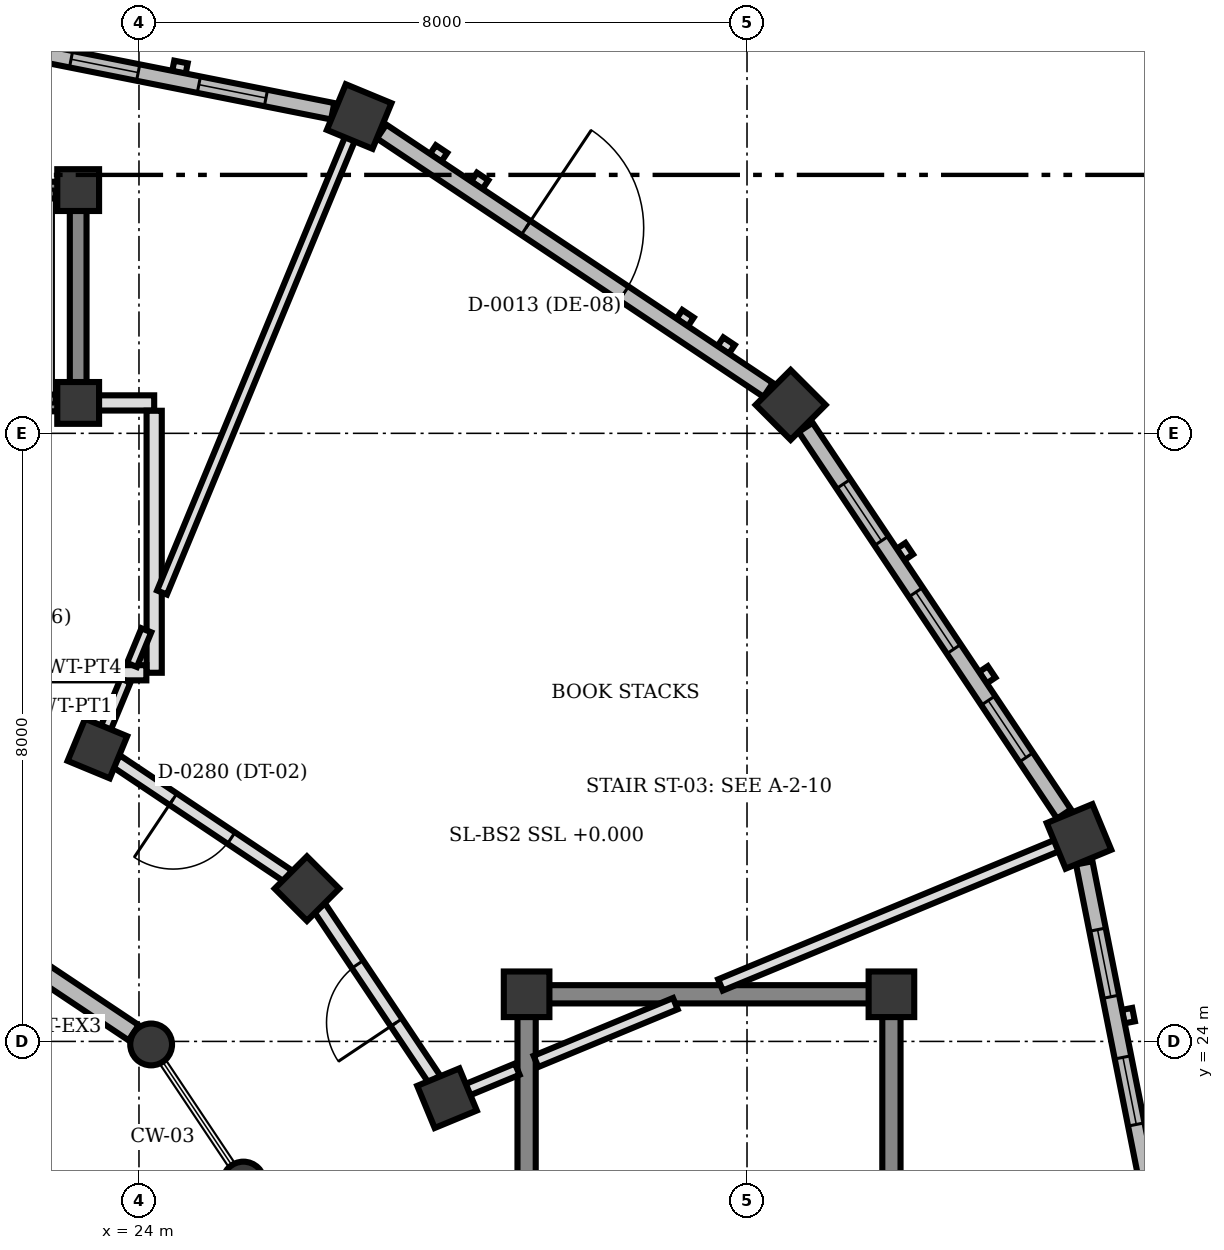
"""IFC4 building model, lengths in metres.
Left out: names, types, materials, properties, quantities, classifications, styles, units other than length and angle.
Written with IfcOpenShell. Run it as: python <this file> out.ifc"""

import sys

from ifc_helpers import new_model, si_unit, direction, frame, frame_2d, origin, origin_2d, place, context, subcontext, project, spatial, rectangle, circle, extrude, element, fill, save


model = new_model("IFC4")
c1 = context("Model", 3, precision=1e-05, world=origin(), true_north=direction((0.0, 1.0)))
c2 = subcontext(c1, "Body", "Model", "MODEL_VIEW")
j1 = project(units=[si_unit("LENGTHUNIT", "METRE"), si_unit("PLANEANGLEUNIT", "RADIAN")], contexts=[c1])
p1 = place(None, origin())
s1 = spatial("IfcSite", under=j1, at=p1, CompositionType="ELEMENT")
p2 = place(p1, origin())
s2 = spatial("IfcBuilding", under=s1, at=p2, CompositionType="ELEMENT")
p3 = place(p2, origin())
s3 = spatial("IfcBuildingStorey", under=s2, at=p3, CompositionType="ELEMENT", Elevation=0.0)
for number, where, z_axis, x_axis in (
    (1, (33.9, 24.62, 0.0), (0.0, 0.0, 1.0), (1.0, 0.0, 0.0)),
    (2, (29.1, 24.62, 0.0), (0.0, 0.0, 1.0), (1.0, 0.0, 0.0)),
):
    element("IfcColumn", number, at=place(p3, frame(where, z_axis=z_axis, x_axis=x_axis)), inside=s3, PredefinedType="COLUMN", context=c2, shape_type="SweptSolid", body=[
        extrude(rectangle(XDim=0.6, YDim=0.6, at=origin_2d()), origin(), (0.0, 0.0, 1.0), 4.5),
    ])
for number, where, z_axis, x_axis in (
    (3, (23.2, 32.4, 0.0), (0.0, 0.0, 1.0), (1.0, 0.0, 0.0)),
    (4, (23.2, 35.2, 0.0), (0.0, 0.0, 1.0), (1.0, 0.0, 0.0)),
):
    element("IfcColumn", number, at=place(p3, frame(where, z_axis=z_axis, x_axis=x_axis)), inside=s3, PredefinedType="COLUMN", context=c2, shape_type="SweptSolid", body=[
        extrude(rectangle(XDim=0.55, YDim=0.55, at=origin_2d()), origin(), (0.0, 0.0, 1.0), 4.5),
    ])
for number, where, z_axis, x_axis in (
    (5, (25.374, 22.143, 0.0), (0.0, 0.0, 1.0), (1.0, 0.0, 0.0)),
    (6, (24.16, 23.96, 0.0), (0.0, 0.0, 1.0), (1.0, 0.0, 0.0)),
):
    element("IfcColumn", number, at=place(p3, frame(where, z_axis=z_axis, x_axis=x_axis)), inside=s3, PredefinedType="COLUMN", context=c2, shape_type="SweptSolid", body=[
        extrude(circle(Radius=0.275, at=origin_2d()), origin(), (0.0, 0.0, 1.0), 4.5),
    ])
for number, where, z_axis, x_axis in (
    (7, (28.053, 23.253, 0.0), (0.0, 0.0, 1.0), (0.924, 0.383, 0.0)),
    (8, (26.21, 26.01, 0.0), (0.0, 0.0, 1.0), (0.707, 0.707, 0.0)),
    (9, (23.453, 27.853, 0.0), (0.0, 0.0, 1.0), (0.383, 0.924, 0.0)),
):
    element("IfcColumn", number, at=place(p3, frame(where, z_axis=z_axis, x_axis=x_axis)), inside=s3, PredefinedType="COLUMN", context=c2, shape_type="SweptSolid", body=[
        extrude(rectangle(XDim=0.6, YDim=0.6, at=origin_2d()), origin(), (0.0, 0.0, 1.0), 4.5),
    ])
for number, where, z_axis, x_axis in (
    (10, (36.368, 26.697, 0.0), (0.0, 0.0, 1.0), (0.924, 0.383, 0.0)),
    (11, (32.574, 32.374, 0.0), (0.0, 0.0, 1.0), (0.707, 0.707, 0.0)),
    (12, (26.897, 36.168, 0.0), (0.0, 0.0, 1.0), (0.383, 0.924, 0.0)),
):
    element("IfcColumn", number, at=place(p3, frame(where, z_axis=z_axis, x_axis=x_axis)), inside=s3, PredefinedType="COLUMN", context=c2, shape_type="SweptSolid", body=[
        extrude(rectangle(XDim=0.65, YDim=0.65, at=origin_2d()), origin(), (0.0, 0.0, 1.0), 4.5),
    ])
p4 = place(p3, frame((36.437, 26.349, 0.0), z_axis=(0.0, 0.0, 1.0), x_axis=(0.195149240347, -0.980773558979, 0.0)))
e13 = element("IfcWall", 13, at=p4, inside=s3, PredefinedType="SOLIDWALL", context=c2, shape_type="SweptSolid", body=[
    extrude(rectangle(XDim=6.119, YDim=0.22, at=frame_2d((3.06, 0.0))), origin(), (0.0, 0.0, 1.0), 3.55),
])
p5 = place(p4, frame((0.896, 0.0, 0.85)))
e14 = element("IfcOpeningElement", 14, at=p5, cuts=e13, PredefinedType="OPENING", context=c2, shape_type="SweptSolid", body=[
    extrude(rectangle(XDim=0.9, YDim=1.4, at=frame_2d((0.45, 0.7))), frame((0.0, 0.12, 0.0), z_axis=(0.0, -1.0, 0.0), x_axis=(1.0, 0.0, 0.0)), (0.0, 0.0, 1.0), 0.24),
])
p6 = place(p4, frame((2.609, 0.0, 0.85)))
e15 = element("IfcOpeningElement", 15, at=p6, cuts=e13, PredefinedType="OPENING", context=c2, shape_type="SweptSolid", body=[
    extrude(rectangle(XDim=0.9, YDim=1.4, at=frame_2d((0.45, 0.7))), frame((0.0, 0.12, 0.0), z_axis=(0.0, -1.0, 0.0), x_axis=(1.0, 0.0, 0.0)), (0.0, 0.0, 1.0), 0.24),
])
p7 = place(p4, frame((4.323, 0.0, 0.85)))
e16 = element("IfcOpeningElement", 16, at=p7, cuts=e13, PredefinedType="OPENING", context=c2, shape_type="SweptSolid", body=[
    extrude(rectangle(XDim=0.9, YDim=1.4, at=frame_2d((0.45, 0.7))), frame((0.0, 0.12, 0.0), z_axis=(0.0, -1.0, 0.0), x_axis=(1.0, 0.0, 0.0)), (0.0, 0.0, 1.0), 0.24),
])
p8 = place(p3, frame((32.771, 32.079, 0.0), z_axis=(0.0, 0.0, 1.0), x_axis=(0.555657446161, -0.831411331728, 0.0)))
e17 = element("IfcWall", 17, at=p8, inside=s3, PredefinedType="SOLIDWALL", context=c2, shape_type="SweptSolid", body=[
    extrude(rectangle(XDim=6.119, YDim=0.22, at=frame_2d((3.059, 0.0))), origin(), (0.0, 0.0, 1.0), 3.55),
])
p9 = place(p8, frame((0.896, 0.0, 0.85)))
e18 = element("IfcOpeningElement", 18, at=p9, cuts=e17, PredefinedType="OPENING", context=c2, shape_type="SweptSolid", body=[
    extrude(rectangle(XDim=0.9, YDim=1.4, at=frame_2d((0.45, 0.7))), frame((0.0, 0.12, 0.0), z_axis=(0.0, -1.0, 0.0), x_axis=(1.0, 0.0, 0.0)), (0.0, 0.0, 1.0), 0.24),
])
p10 = place(p8, frame((2.609, 0.0, 0.85)))
e19 = element("IfcOpeningElement", 19, at=p10, cuts=e17, PredefinedType="OPENING", context=c2, shape_type="SweptSolid", body=[
    extrude(rectangle(XDim=0.9, YDim=1.4, at=frame_2d((0.45, 0.7))), frame((0.0, 0.12, 0.0), z_axis=(0.0, -1.0, 0.0), x_axis=(1.0, 0.0, 0.0)), (0.0, 0.0, 1.0), 0.24),
])
p11 = place(p8, frame((4.323, 0.0, 0.85)))
e20 = element("IfcOpeningElement", 20, at=p11, cuts=e17, PredefinedType="OPENING", context=c2, shape_type="SweptSolid", body=[
    extrude(rectangle(XDim=0.9, YDim=1.4, at=frame_2d((0.45, 0.7))), frame((0.0, 0.12, 0.0), z_axis=(0.0, -1.0, 0.0), x_axis=(1.0, 0.0, 0.0)), (0.0, 0.0, 1.0), 0.24),
])
p12 = place(p3, frame((27.192, 35.971, 0.0), z_axis=(0.0, 0.0, 1.0), x_axis=(0.831411331728, -0.555657446161, 0.0)))
e21 = element("IfcWall", 21, at=p12, inside=s3, PredefinedType="SOLIDWALL", context=c2, shape_type="SweptSolid", body=[
    extrude(rectangle(XDim=6.119, YDim=0.22, at=frame_2d((3.059, 0.0))), origin(), (0.0, 0.0, 1.0), 3.55),
])
p13 = place(p12, frame((2.284, 0.0, 0.0)))
e22 = element("IfcOpeningElement", 22, at=p13, cuts=e21, PredefinedType="OPENING", context=c2, shape_type="SweptSolid", body=[
    extrude(rectangle(XDim=1.55, YDim=2.2, at=frame_2d((0.775, 1.1))), frame((0.0, 0.12, 0.0), z_axis=(0.0, -1.0, 0.0), x_axis=(1.0, 0.0, 0.0)), (0.0, 0.0, 1.0), 0.24),
])
p14 = place(p3, frame((23.93, 24.114, 0.0), z_axis=(0.0, 0.0, 1.0), x_axis=(-0.83165874011, 0.555287078904, 0.0)))
e23 = element("IfcWall", 23, at=p14, inside=s3, PredefinedType="SOLIDWALL", context=c2, shape_type="SweptSolid", body=[
    extrude(rectangle(XDim=1.632, YDim=0.24, at=frame_2d((0.816, 0.0))), origin(), (0.0, 0.0, 1.0), 3.55),
])
p15 = place(p3, frame((20.548, 37.431, 0.0), z_axis=(0.0, 0.0, 1.0), x_axis=(0.98077967596, -0.19511849534, 0.0)))
e24 = element("IfcWall", 24, at=p15, inside=s3, PredefinedType="SOLIDWALL", context=c2, shape_type="SweptSolid", body=[
    extrude(rectangle(XDim=6.119, YDim=0.22, at=frame_2d((3.059, 0.0))), origin(), (0.0, 0.0, 1.0), 3.55),
])
p16 = place(p15, frame((0.896, 0.0, 0.85)))
e25 = element("IfcOpeningElement", 25, at=p16, cuts=e24, PredefinedType="OPENING", context=c2, shape_type="SweptSolid", body=[
    extrude(rectangle(XDim=0.9, YDim=1.4, at=frame_2d((0.45, 0.7))), frame((0.0, 0.12, 0.0), z_axis=(0.0, -1.0, 0.0), x_axis=(1.0, 0.0, 0.0)), (0.0, 0.0, 1.0), 0.24),
])
p17 = place(p15, frame((2.609, 0.0, 0.85)))
e26 = element("IfcOpeningElement", 26, at=p17, cuts=e24, PredefinedType="OPENING", context=c2, shape_type="SweptSolid", body=[
    extrude(rectangle(XDim=0.9, YDim=1.4, at=frame_2d((0.45, 0.7))), frame((0.0, 0.12, 0.0), z_axis=(0.0, -1.0, 0.0), x_axis=(1.0, 0.0, 0.0)), (0.0, 0.0, 1.0), 0.24),
])
p18 = place(p15, frame((4.323, 0.0, 0.85)))
e27 = element("IfcOpeningElement", 27, at=p18, cuts=e24, PredefinedType="OPENING", context=c2, shape_type="SweptSolid", body=[
    extrude(rectangle(XDim=0.9, YDim=1.4, at=frame_2d((0.45, 0.7))), frame((0.0, 0.12, 0.0), z_axis=(0.0, -1.0, 0.0), x_axis=(1.0, 0.0, 0.0)), (0.0, 0.0, 1.0), 0.24),
])
p19 = place(p3, frame((29.1, 16.192, 0.0), z_axis=(0.0, 0.0, 1.0), x_axis=(0.0, 1.0, 0.0)))
e28 = element("IfcWall", 28, at=p19, inside=s3, PredefinedType="SHEAR", context=c2, shape_type="SweptSolid", body=[
    extrude(rectangle(XDim=8.136, YDim=0.24, at=frame_2d((4.068, 0.0))), origin(), (0.0, 0.0, 1.0), 4.24),
])
p20 = place(p19, frame((1.012, 0.0, 0.0)))
e29 = element("IfcOpeningElement", 29, at=p20, cuts=e28, PredefinedType="OPENING", context=c2, shape_type="SweptSolid", body=[
    extrude(rectangle(XDim=0.88, YDim=2.1, at=frame_2d((0.44, 1.05))), frame((0.0, 0.13, 0.0), z_axis=(0.0, -1.0, 0.0), x_axis=(1.0, 0.0, 0.0)), (0.0, 0.0, 1.0), 0.26),
])
p21 = place(p3, frame((33.9, 24.328, 0.0), z_axis=(0.0, 0.0, 1.0), x_axis=(0.0, -1.0, 0.0)))
e30 = element("IfcWall", 30, at=p21, inside=s3, PredefinedType="SHEAR", context=c2, shape_type="SweptSolid", body=[
    extrude(rectangle(XDim=8.136, YDim=0.24, at=frame_2d((4.068, 0.0))), origin(), (0.0, 0.0, 1.0), 4.24),
])
p22 = place(p3, frame((33.608, 24.62, 0.0), z_axis=(0.0, 0.0, 1.0), x_axis=(-1.0, 0.0, 0.0)))
e31 = element("IfcWall", 31, at=p22, inside=s3, PredefinedType="SHEAR", context=c2, shape_type="SweptSolid", body=[
    extrude(rectangle(XDim=4.216, YDim=0.24, at=frame_2d((2.108, 0.0))), origin(), (0.0, 0.0, 1.0), 4.24),
])
p23 = place(p3, frame((20.867, 32.4, 0.0), z_axis=(0.0, 0.0, 1.0), x_axis=(1.0, 0.0, 0.0)))
e32 = element("IfcWall", 32, at=p23, inside=s3, PredefinedType="SHEAR", context=c2, shape_type="SweptSolid", body=[
    extrude(rectangle(XDim=2.066, YDim=0.22, at=frame_2d((1.033, 0.0))), origin(), (0.0, 0.0, 1.0), 4.24),
])
p24 = place(p23, frame((0.483, 0.0, 0.0)))
e33 = element("IfcOpeningElement", 33, at=p24, cuts=e32, PredefinedType="OPENING", context=c2, shape_type="SweptSolid", body=[
    extrude(rectangle(XDim=1.1, YDim=2.15, at=frame_2d((0.55, 1.075))), frame((0.0, 0.12, 0.0), z_axis=(0.0, -1.0, 0.0), x_axis=(1.0, 0.0, 0.0)), (0.0, 0.0, 1.0), 0.24),
])
p25 = place(p3, frame((23.2, 32.667, 0.0), z_axis=(0.0, 0.0, 1.0), x_axis=(0.0, 1.0, 0.0)))
e34 = element("IfcWall", 34, at=p25, inside=s3, PredefinedType="SHEAR", context=c2, shape_type="SweptSolid", body=[
    extrude(rectangle(XDim=2.266, YDim=0.22, at=frame_2d((1.133, 0.0))), origin(), (0.0, 0.0, 1.0), 4.24),
])
p26 = place(p3, frame((22.933, 35.2, 0.0), z_axis=(0.0, 0.0, 1.0), x_axis=(-1.0, 0.0, 0.0)))
e35 = element("IfcWall", 35, at=p26, inside=s3, PredefinedType="SHEAR", context=c2, shape_type="SweptSolid", body=[
    extrude(rectangle(XDim=2.066, YDim=0.22, at=frame_2d((1.033, 0.0))), origin(), (0.0, 0.0, 1.0), 4.24),
])
p27 = place(p3, frame((23.467, 32.4, 0.0), z_axis=(0.0, 0.0, 1.0), x_axis=(1.0, 0.0, 0.0)))
e36 = element("IfcWall", 36, at=p27, inside=s3, PredefinedType="PARTITIONING", context=c2, shape_type="SweptSolid", body=[
    extrude(rectangle(XDim=0.733, YDim=0.2, at=frame_2d((0.366, 0.0))), origin(), (0.0, 0.0, 1.0), 4.2),
])
p28 = place(p3, frame((24.2, 28.85, 0.0), z_axis=(0.0, 0.0, 1.0), x_axis=(0.0, 1.0, 0.0)))
e37 = element("IfcWall", 37, at=p28, inside=s3, PredefinedType="PARTITIONING", context=c2, shape_type="SweptSolid", body=[
    extrude(rectangle(XDim=3.447, YDim=0.2, at=frame_2d((1.724, 0.0))), origin(), (0.0, 0.0, 1.0), 3.552),
])
p29 = place(p3, frame((24.097, 28.85, 0.0), z_axis=(0.0, 0.0, 1.0), x_axis=(-1.0, 0.0, 0.0)))
e38 = element("IfcWall", 38, at=p29, inside=s3, PredefinedType="PARTITIONING", context=c2, shape_type="SweptSolid", body=[
    extrude(rectangle(XDim=3.394, YDim=0.2, at=frame_2d((1.697, 0.0))), origin(), (0.0, 0.0, 1.0), 3.552),
])
p30 = place(p29, frame((1.519, 0.0, 0.0)))
e39 = element("IfcOpeningElement", 39, at=p30, cuts=e38, PredefinedType="OPENING", context=c2, shape_type="SweptSolid", body=[
    extrude(rectangle(XDim=0.9, YDim=2.2, at=frame_2d((0.45, 1.1))), frame((0.0, 0.11, 0.0), z_axis=(0.0, -1.0, 0.0), x_axis=(1.0, 0.0, 0.0)), (0.0, 0.0, 1.0), 0.22),
])
p31 = place(p3, frame((28.323, 23.364, 0.0), z_axis=(0.0, 0.0, 1.0), x_axis=(0.923840285319, 0.382778169729, 0.0)))
e40 = element("IfcWall", 40, at=p31, inside=s3, PredefinedType="PARTITIONING", context=c2, shape_type="SweptSolid", body=[
    extrude(rectangle(XDim=0.708, YDim=0.16, at=frame_2d((0.354, 0.0))), origin(), (0.0, 0.0, 1.0), 4.2),
])
p32 = place(p3, frame((29.223, 23.737, 0.0), z_axis=(0.0, 0.0, 1.0), x_axis=(0.923817443679, 0.382833293686, 0.0)))
e41 = element("IfcWall", 41, at=p32, inside=s3, PredefinedType="PARTITIONING", context=c2, shape_type="SweptSolid", body=[
    extrude(rectangle(XDim=1.985, YDim=0.16, at=frame_2d((0.993, 0.0))), origin(), (0.0, 0.0, 1.0), 4.2),
])
p33 = place(p3, frame((31.651, 24.743, 0.0), z_axis=(0.0, 0.0, 1.0), x_axis=(0.923842829076, 0.38277203028, 0.0)))
e42 = element("IfcWall", 42, at=p33, inside=s3, PredefinedType="PARTITIONING", context=c2, shape_type="SweptSolid", body=[
    extrude(rectangle(XDim=4.789, YDim=0.16, at=frame_2d((2.395, 0.0))), origin(), (0.0, 0.0, 1.0), 4.2),
])
p34 = place(p3, frame((23.564, 28.123, 0.0), z_axis=(0.0, 0.0, 1.0), x_axis=(0.383383487336, 0.923589249417, 0.0)))
e43 = element("IfcWall", 43, at=p34, inside=s3, PredefinedType="PARTITIONING", context=c2, shape_type="SweptSolid", body=[
    extrude(rectangle(XDim=0.676, YDim=0.14, at=frame_2d((0.338, 0.0))), origin(), (0.0, 0.0, 1.0), 3.552),
])
p35 = place(p3, frame((23.908, 28.953, 0.0), z_axis=(0.0, 0.0, 1.0), x_axis=(0.3827885685, 0.92383597669, 0.0)))
e44 = element("IfcWall", 44, at=p35, inside=s3, PredefinedType="PARTITIONING", context=c2, shape_type="SweptSolid", body=[
    extrude(rectangle(XDim=0.494, YDim=0.14, at=frame_2d((0.247, 0.0))), origin(), (0.0, 0.0, 1.0), 3.552),
])
p36 = place(p3, frame((24.303, 29.906, 0.0), z_axis=(0.0, 0.0, 1.0), x_axis=(0.382744474407, 0.923854245707, 0.0)))
e45 = element("IfcWall", 45, at=p36, inside=s3, PredefinedType="PARTITIONING", context=c2, shape_type="SweptSolid", body=[
    extrude(rectangle(XDim=6.461, YDim=0.14, at=frame_2d((3.23, 0.0))), origin(), (0.0, 0.0, 1.0), 3.552),
])
p37 = place(p3, frame((27.888, 23.501, 0.0), z_axis=(0.0, 0.0, 1.0), x_axis=(-0.556128339679, 0.831096426298, 0.0)))
e46 = element("IfcWall", 46, at=p37, inside=s3, PredefinedType="PARTITIONING", context=c2, shape_type="SweptSolid", body=[
    extrude(rectangle(XDim=2.72, YDim=0.18, at=frame_2d((1.36, 0.0))), origin(), (0.0, 0.0, 1.0), 3.552),
])
p38 = place(p37, frame((0.9, 0.0, 0.0)))
e47 = element("IfcOpeningElement", 47, at=p38, cuts=e46, PredefinedType="OPENING", context=c2, shape_type="SweptSolid", body=[
    extrude(rectangle(XDim=0.92, YDim=2.1, at=frame_2d((0.46, 1.05))), frame((0.0, 0.1, 0.0), z_axis=(0.0, -1.0, 0.0), x_axis=(1.0, 0.0, 0.0)), (0.0, 0.0, 1.0), 0.2),
])
p39 = place(p3, frame((25.962, 26.175, 0.0), z_axis=(0.0, 0.0, 1.0), x_axis=(-0.831096426298, 0.556128339679, 0.0)))
e48 = element("IfcWall", 48, at=p39, inside=s3, PredefinedType="PARTITIONING", context=c2, shape_type="SweptSolid", body=[
    extrude(rectangle(XDim=2.72, YDim=0.18, at=frame_2d((1.36, 0.0))), origin(), (0.0, 0.0, 1.0), 3.552),
])
p40 = place(p39, frame((0.9, 0.0, 0.0)))
e49 = element("IfcOpeningElement", 49, at=p40, cuts=e48, PredefinedType="OPENING", context=c2, shape_type="SweptSolid", body=[
    extrude(rectangle(XDim=0.92, YDim=2.1, at=frame_2d((0.46, 1.05))), frame((0.0, 0.1, 0.0), z_axis=(0.0, -1.0, 0.0), x_axis=(1.0, 0.0, 0.0)), (0.0, 0.0, 1.0), 0.2),
])
p41 = place(p5, origin())
e50 = element("IfcWindow", 50, at=p41, inside=s3, PartitioningType="SINGLE_PANEL", PredefinedType="WINDOW", context=c2, shape_type="SweptSolid", body=[
    extrude(rectangle(XDim=0.9, YDim=1.4, at=frame_2d((0.45, 0.7))), frame((0.0, 0.03, 0.0), z_axis=(0.0, -1.0, 0.0), x_axis=(1.0, 0.0, 0.0)), (0.0, 0.0, 1.0), 0.06),
])
fill(e14, e50)
p42 = place(p6, origin())
e51 = element("IfcWindow", 51, at=p42, inside=s3, PartitioningType="SINGLE_PANEL", PredefinedType="WINDOW", context=c2, shape_type="SweptSolid", body=[
    extrude(rectangle(XDim=0.9, YDim=1.4, at=frame_2d((0.45, 0.7))), frame((0.0, 0.03, 0.0), z_axis=(0.0, -1.0, 0.0), x_axis=(1.0, 0.0, 0.0)), (0.0, 0.0, 1.0), 0.06),
])
fill(e15, e51)
p43 = place(p9, origin())
e52 = element("IfcWindow", 52, at=p43, inside=s3, PartitioningType="SINGLE_PANEL", PredefinedType="WINDOW", context=c2, shape_type="SweptSolid", body=[
    extrude(rectangle(XDim=0.9, YDim=1.4, at=frame_2d((0.45, 0.7))), frame((0.0, 0.03, 0.0), z_axis=(0.0, -1.0, 0.0), x_axis=(1.0, 0.0, 0.0)), (0.0, 0.0, 1.0), 0.06),
])
fill(e18, e52)
p44 = place(p10, origin())
e53 = element("IfcWindow", 53, at=p44, inside=s3, PartitioningType="SINGLE_PANEL", PredefinedType="WINDOW", context=c2, shape_type="SweptSolid", body=[
    extrude(rectangle(XDim=0.9, YDim=1.4, at=frame_2d((0.45, 0.7))), frame((0.0, 0.03, 0.0), z_axis=(0.0, -1.0, 0.0), x_axis=(1.0, 0.0, 0.0)), (0.0, 0.0, 1.0), 0.06),
])
fill(e19, e53)
p45 = place(p11, origin())
e54 = element("IfcWindow", 54, at=p45, inside=s3, PartitioningType="SINGLE_PANEL", PredefinedType="WINDOW", context=c2, shape_type="SweptSolid", body=[
    extrude(rectangle(XDim=0.9, YDim=1.4, at=frame_2d((0.45, 0.7))), frame((0.0, 0.03, 0.0), z_axis=(0.0, -1.0, 0.0), x_axis=(1.0, 0.0, 0.0)), (0.0, 0.0, 1.0), 0.06),
])
fill(e20, e54)
p46 = place(p13, origin())
e55 = element("IfcDoor", 55, at=p46, inside=s3, OperationType="SINGLE_SWING_LEFT", PredefinedType="DOOR", context=c2, shape_type="SweptSolid", body=[
    extrude(rectangle(XDim=1.55, YDim=2.2, at=frame_2d((0.775, 1.1))), frame((0.0, 0.025, 0.0), z_axis=(0.0, -1.0, 0.0), x_axis=(1.0, 0.0, 0.0)), (0.0, 0.0, 1.0), 0.05),
])
fill(e22, e55)
p47 = place(p17, origin())
e56 = element("IfcWindow", 56, at=p47, inside=s3, PartitioningType="SINGLE_PANEL", PredefinedType="WINDOW", context=c2, shape_type="SweptSolid", body=[
    extrude(rectangle(XDim=0.9, YDim=1.4, at=frame_2d((0.45, 0.7))), frame((0.0, 0.03, 0.0), z_axis=(0.0, -1.0, 0.0), x_axis=(1.0, 0.0, 0.0)), (0.0, 0.0, 1.0), 0.06),
])
fill(e26, e56)
p48 = place(p18, origin())
e57 = element("IfcWindow", 57, at=p48, inside=s3, PartitioningType="SINGLE_PANEL", PredefinedType="WINDOW", context=c2, shape_type="SweptSolid", body=[
    extrude(rectangle(XDim=0.9, YDim=1.4, at=frame_2d((0.45, 0.7))), frame((0.0, 0.03, 0.0), z_axis=(0.0, -1.0, 0.0), x_axis=(1.0, 0.0, 0.0)), (0.0, 0.0, 1.0), 0.06),
])
fill(e27, e57)
p49 = place(p38, origin())
e58 = element("IfcDoor", 58, at=p49, inside=s3, OperationType="SINGLE_SWING_LEFT", PredefinedType="DOOR", context=c2, shape_type="SweptSolid", body=[
    extrude(rectangle(XDim=0.92, YDim=2.1, at=frame_2d((0.46, 1.05))), frame((0.0, 0.025, 0.0), z_axis=(0.0, -1.0, 0.0), x_axis=(1.0, 0.0, 0.0)), (0.0, 0.0, 1.0), 0.05),
])
fill(e47, e58)
p50 = place(p40, origin())
e59 = element("IfcDoor", 59, at=p50, inside=s3, OperationType="SINGLE_SWING_RIGHT", PredefinedType="DOOR", context=c2, shape_type="SweptSolid", body=[
    extrude(rectangle(XDim=0.92, YDim=2.1, at=frame_2d((0.46, 1.05))), frame((0.0, 0.025, 0.0), z_axis=(0.0, -1.0, 0.0), x_axis=(1.0, 0.0, 0.0)), (0.0, 0.0, 1.0), 0.05),
])
fill(e49, e59)
save(model, sys.argv[1])
